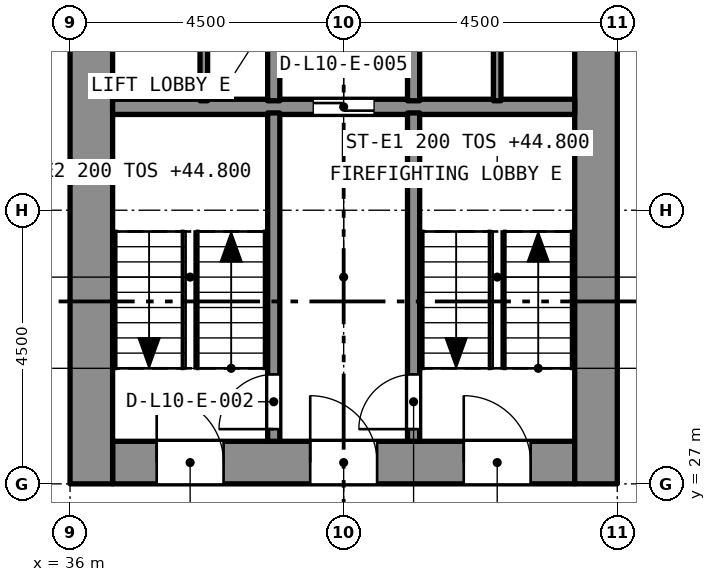
"""IFC4 building model, lengths in metres.
Left out: names, types, materials, properties, quantities, classifications, styles, units other than length and angle.
Written with IfcOpenShell. Run it as: python <this file> out.ifc"""

import sys

from ifc_helpers import new_model, si_unit, direction, frame, frame_2d, origin, place, context, subcontext, project, spatial, rectangle, extrude, element, fill, save


model = new_model("IFC4")
c1 = context("Model", 3, precision=1e-05, world=origin(), true_north=direction((0.0, 1.0)))
c2 = subcontext(c1, "Body", "Model", "MODEL_VIEW")
j1 = project(units=[si_unit("LENGTHUNIT", "METRE"), si_unit("PLANEANGLEUNIT", "RADIAN")], contexts=[c1])
p1 = place(None, origin())
s1 = spatial("IfcSite", under=j1, at=p1, CompositionType="ELEMENT")
p2 = place(p1, origin())
s2 = spatial("IfcBuilding", under=s1, at=p2, CompositionType="ELEMENT")
p3 = place(p2, frame((0.0, 0.0, 43.2)))
s3 = spatial("IfcBuildingStorey", under=s2, at=p3, CompositionType="ELEMENT", Elevation=43.2)
p4 = place(p3, frame((36.7, 27.35, 0.0), z_axis=(0.0, 0.0, 1.0), x_axis=(1.0, 0.0, 0.0)))
e1 = element("IfcWall", 1, at=p4, inside=s3, PredefinedType="SOLIDWALL", context=c2, shape_type="SweptSolid", body=[
    extrude(rectangle(XDim=7.6, YDim=0.7, at=frame_2d((3.8, 0.0))), origin(), (0.0, 0.0, 1.0), 3.2),
])
p5 = place(p4, frame((5.775, 0.0, 0.0)))
e2 = element("IfcOpeningElement", 2, at=p5, cuts=e1, PredefinedType="OPENING", context=c2, shape_type="SweptSolid", body=[
    extrude(rectangle(XDim=1.1, YDim=2.1, at=frame_2d((0.55, 1.05))), frame((0.0, 0.36, 0.0), z_axis=(0.0, -1.0, 0.0), x_axis=(1.0, 0.0, 0.0)), (0.0, 0.0, 1.0), 0.72),
])
p6 = place(p4, frame((3.25, 0.0, 0.0)))
e3 = element("IfcOpeningElement", 3, at=p6, cuts=e1, PredefinedType="OPENING", context=c2, shape_type="SweptSolid", body=[
    extrude(rectangle(XDim=1.1, YDim=2.1, at=frame_2d((0.55, 1.05))), frame((0.0, 0.36, 0.0), z_axis=(0.0, -1.0, 0.0), x_axis=(1.0, 0.0, 0.0)), (0.0, 0.0, 1.0), 0.72),
])
p7 = place(p4, frame((0.725, 0.0, 0.0)))
e4 = element("IfcOpeningElement", 4, at=p7, cuts=e1, PredefinedType="OPENING", context=c2, shape_type="SweptSolid", body=[
    extrude(rectangle(XDim=1.1, YDim=2.1, at=frame_2d((0.55, 1.05))), frame((0.0, 0.36, 0.0), z_axis=(0.0, -1.0, 0.0), x_axis=(1.0, 0.0, 0.0)), (0.0, 0.0, 1.0), 0.72),
])
p8 = place(p3, frame((36.35, 27.0, 0.0), z_axis=(0.0, 0.0, 1.0), x_axis=(0.0, 1.0, 0.0)))
e5 = element("IfcWall", 5, at=p8, inside=s3, PredefinedType="SOLIDWALL", context=c2, shape_type="SweptSolid", body=[
    extrude(rectangle(XDim=13.5, YDim=0.7, at=frame_2d((6.75, 0.0))), origin(), (0.0, 0.0, 1.0), 3.2),
])
p9 = place(p8, frame((8.95, 0.0, 0.0)))
e6 = element("IfcOpeningElement", 6, at=p9, cuts=e5, PredefinedType="OPENING", context=c2, shape_type="SweptSolid", body=[
    extrude(rectangle(XDim=1.2, YDim=2.1, at=frame_2d((0.6, 1.05))), frame((0.0, 0.36, 0.0), z_axis=(0.0, -1.0, 0.0), x_axis=(1.0, 0.0, 0.0)), (0.0, 0.0, 1.0), 0.72),
])
p10 = place(p3, frame((44.65, 27.0, 0.0), z_axis=(0.0, 0.0, 1.0), x_axis=(0.0, 1.0, 0.0)))
e7 = element("IfcWall", 7, at=p10, inside=s3, PredefinedType="SOLIDWALL", context=c2, shape_type="SweptSolid", body=[
    extrude(rectangle(XDim=13.5, YDim=0.7, at=frame_2d((6.75, 0.0))), origin(), (0.0, 0.0, 1.0), 3.2),
])
p11 = place(p10, frame((8.95, 0.0, 0.0)))
e8 = element("IfcOpeningElement", 8, at=p11, cuts=e7, PredefinedType="OPENING", context=c2, shape_type="SweptSolid", body=[
    extrude(rectangle(XDim=1.2, YDim=2.1, at=frame_2d((0.6, 1.05))), frame((0.0, 0.36, 0.0), z_axis=(0.0, -1.0, 0.0), x_axis=(1.0, 0.0, 0.0)), (0.0, 0.0, 1.0), 0.72),
])
p12 = place(p3, frame((36.7, 33.2, 0.0), z_axis=(0.0, 0.0, 1.0), x_axis=(1.0, 0.0, 0.0)))
e9 = element("IfcWall", 9, at=p12, inside=s3, PredefinedType="SOLIDWALL", context=c2, shape_type="SweptSolid", body=[
    extrude(rectangle(XDim=7.6, YDim=0.25, at=frame_2d((3.8, 0.0))), origin(), (0.0, 0.0, 1.0), 2.9),
])
p13 = place(p12, frame((3.3, 0.0, 0.0)))
e10 = element("IfcOpeningElement", 10, at=p13, cuts=e9, PredefinedType="OPENING", context=c2, shape_type="SweptSolid", body=[
    extrude(rectangle(XDim=1.0, YDim=2.1, at=frame_2d((0.5, 1.05))), frame((0.0, 0.135, 0.0), z_axis=(0.0, -1.0, 0.0), x_axis=(1.0, 0.0, 0.0)), (0.0, 0.0, 1.0), 0.27),
])
p14 = place(p3, frame((41.65, 27.7, 0.0), z_axis=(0.0, 0.0, 1.0), x_axis=(0.0, 1.0, 0.0)))
e11 = element("IfcWall", 11, at=p14, inside=s3, PredefinedType="SOLIDWALL", context=c2, shape_type="SweptSolid", body=[
    extrude(rectangle(XDim=5.4, YDim=0.2, at=frame_2d((2.7, 0.0))), origin(), (0.0, 0.0, 1.0), 2.9),
])
p15 = place(p14, frame((0.2, 0.0, 0.0)))
e12 = element("IfcOpeningElement", 12, at=p15, cuts=e11, PredefinedType="OPENING", context=c2, shape_type="SweptSolid", body=[
    extrude(rectangle(XDim=0.9, YDim=2.1, at=frame_2d((0.45, 1.05))), frame((0.0, 0.11, 0.0), z_axis=(0.0, -1.0, 0.0), x_axis=(1.0, 0.0, 0.0)), (0.0, 0.0, 1.0), 0.22),
])
p16 = place(p3, frame((39.35, 27.7, 0.0), z_axis=(0.0, 0.0, 1.0), x_axis=(0.0, 1.0, 0.0)))
e13 = element("IfcWall", 13, at=p16, inside=s3, PredefinedType="SOLIDWALL", context=c2, shape_type="SweptSolid", body=[
    extrude(rectangle(XDim=5.4, YDim=0.2, at=frame_2d((2.7, 0.0))), origin(), (0.0, 0.0, 1.0), 2.9),
])
p17 = place(p16, frame((0.2, 0.0, 0.0)))
e14 = element("IfcOpeningElement", 14, at=p17, cuts=e13, PredefinedType="OPENING", context=c2, shape_type="SweptSolid", body=[
    extrude(rectangle(XDim=0.9, YDim=2.1, at=frame_2d((0.45, 1.05))), frame((0.0, 0.11, 0.0), z_axis=(0.0, -1.0, 0.0), x_axis=(1.0, 0.0, 0.0)), (0.0, 0.0, 1.0), 0.22),
])
for number, where, z_axis, x_axis in (
    (15, (41.65, 33.3, 0.0), (0.0, 0.0, 1.0), (0.0, 1.0, 0.0)),
    (16, (39.35, 33.3, 0.0), (0.0, 0.0, 1.0), (0.0, 1.0, 0.0)),
):
    element("IfcWall", number, at=place(p3, frame(where, z_axis=z_axis, x_axis=x_axis)), inside=s3, PredefinedType="SOLIDWALL", context=c2, shape_type="SweptSolid", body=[
        extrude(rectangle(XDim=2.3, YDim=0.2, at=frame_2d((1.15, 0.0))), origin(), (0.0, 0.0, 1.0), 2.9),
    ])
for number, where, z_axis, x_axis in (
    (17, (43.025, 33.3, 0.0), (0.0, 0.0, 1.0), (0.0, 1.0, 0.0)),
    (18, (38.2, 33.3, 0.0), (0.0, 0.0, 1.0), (0.0, 1.0, 0.0)),
):
    element("IfcWall", number, at=place(p3, frame(where, z_axis=z_axis, x_axis=x_axis)), inside=s3, PredefinedType="PARTITIONING", context=c2, shape_type="SweptSolid", body=[
        extrude(rectangle(XDim=2.3, YDim=0.125, at=frame_2d((1.15, 0.0))), origin(), (0.0, 0.0, 1.0), 2.9),
    ])
p18 = place(p15, origin())
e19 = element("IfcDoor", 19, at=p18, inside=s3, OperationType="SINGLE_SWING_LEFT", PredefinedType="DOOR", context=c2, shape_type="SweptSolid", body=[
    extrude(rectangle(XDim=0.9, YDim=2.1, at=frame_2d((0.45, 1.05))), frame((0.0, 0.025, 0.0), z_axis=(0.0, -1.0, 0.0), x_axis=(1.0, 0.0, 0.0)), (0.0, 0.0, 1.0), 0.05),
])
fill(e12, e19)
p19 = place(p17, origin())
e20 = element("IfcDoor", 20, at=p19, inside=s3, OperationType="SINGLE_SWING_LEFT", PredefinedType="DOOR", context=c2, shape_type="SweptSolid", body=[
    extrude(rectangle(XDim=0.9, YDim=2.1, at=frame_2d((0.45, 1.05))), frame((0.0, 0.025, 0.0), z_axis=(0.0, -1.0, 0.0), x_axis=(1.0, 0.0, 0.0)), (0.0, 0.0, 1.0), 0.05),
])
fill(e14, e20)
p20 = place(p13, origin())
e21 = element("IfcDoor", 21, at=p20, inside=s3, OperationType="SLIDING_TO_LEFT", PredefinedType="DOOR", context=c2, shape_type="SweptSolid", body=[
    extrude(rectangle(XDim=1.0, YDim=2.1, at=frame_2d((0.5, 1.05))), frame((0.0, 0.025, 0.0), z_axis=(0.0, -1.0, 0.0), x_axis=(1.0, 0.0, 0.0)), (0.0, 0.0, 1.0), 0.05),
])
fill(e10, e21)
p21 = place(p5, origin())
e22 = element("IfcDoor", 22, at=p21, inside=s3, OperationType="SINGLE_SWING_LEFT", PredefinedType="DOOR", context=c2, shape_type="SweptSolid", body=[
    extrude(rectangle(XDim=1.1, YDim=2.1, at=frame_2d((0.55, 1.05))), frame((0.0, 0.025, 0.0), z_axis=(0.0, -1.0, 0.0), x_axis=(1.0, 0.0, 0.0)), (0.0, 0.0, 1.0), 0.05),
])
fill(e2, e22)
p22 = place(p6, origin())
e23 = element("IfcDoor", 23, at=p22, inside=s3, OperationType="SINGLE_SWING_LEFT", PredefinedType="DOOR", context=c2, shape_type="SweptSolid", body=[
    extrude(rectangle(XDim=1.1, YDim=2.1, at=frame_2d((0.55, 1.05))), frame((0.0, 0.025, 0.0), z_axis=(0.0, -1.0, 0.0), x_axis=(1.0, 0.0, 0.0)), (0.0, 0.0, 1.0), 0.05),
])
fill(e3, e23)
p23 = place(p7, origin())
e24 = element("IfcDoor", 24, at=p23, inside=s3, OperationType="SINGLE_SWING_LEFT", PredefinedType="DOOR", context=c2, shape_type="SweptSolid", body=[
    extrude(rectangle(XDim=1.1, YDim=2.1, at=frame_2d((0.55, 1.05))), frame((0.0, 0.025, 0.0), z_axis=(0.0, -1.0, 0.0), x_axis=(1.0, 0.0, 0.0)), (0.0, 0.0, 1.0), 0.05),
])
fill(e4, e24)
save(model, sys.argv[1])
